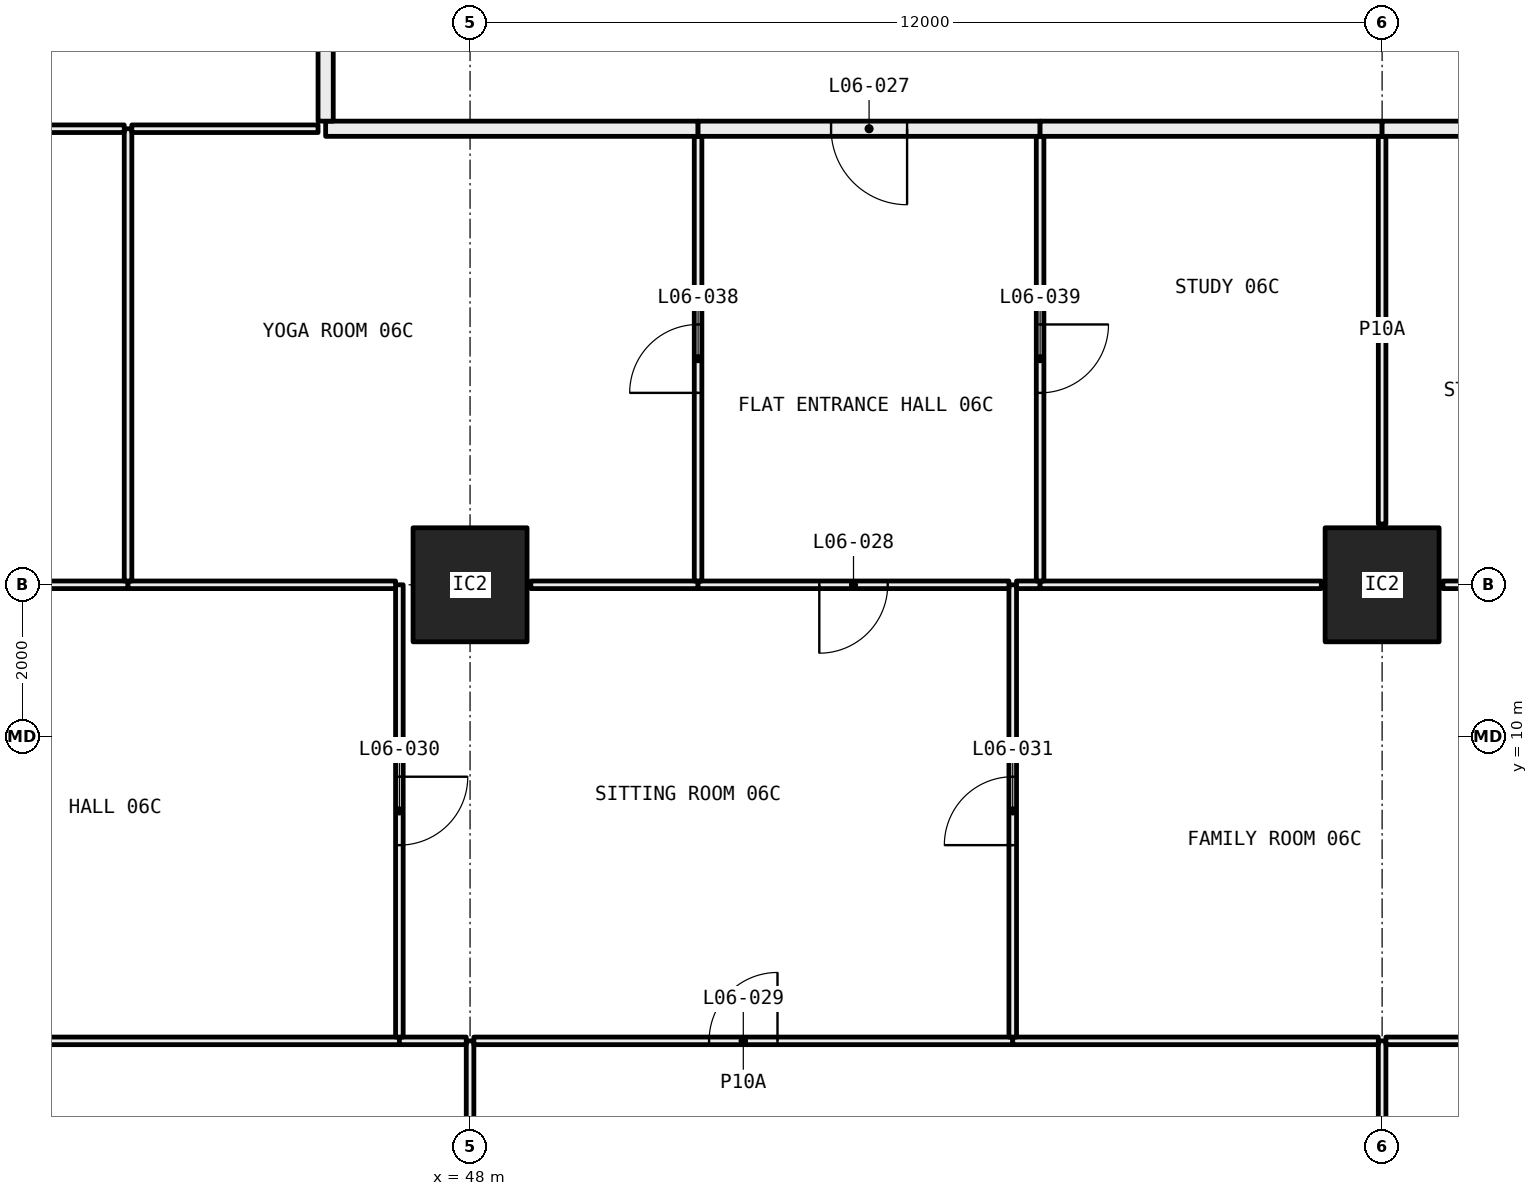
"""IFC4 building model, lengths in metres.
Left out: names, types, materials, properties, quantities, classifications, styles, units other than length and angle.
Written with IfcOpenShell. Run it as: python <this file> out.ifc"""

import sys

from ifc_helpers import new_model, si_unit, direction, frame, frame_2d, origin, origin_2d, place, context, subcontext, project, spatial, rectangle, hollow_rectangle, extrude, element, fill, save


model = new_model("IFC4")
c1 = context("Model", 3, precision=1e-05, world=origin(), true_north=direction((0.0, 1.0)))
c2 = subcontext(c1, "Body", "Model", "MODEL_VIEW")
j1 = project(units=[si_unit("LENGTHUNIT", "METRE"), si_unit("PLANEANGLEUNIT", "RADIAN")], contexts=[c1])
p1 = place(None, origin())
s1 = spatial("IfcSite", under=j1, at=p1, CompositionType="ELEMENT")
p2 = place(p1, origin())
s2 = spatial("IfcBuilding", under=s1, at=p2, CompositionType="ELEMENT")
p3 = place(p2, frame((0.0, 0.0, 33.45)))
s3 = spatial("IfcBuildingStorey", under=s2, at=p3, CompositionType="ELEMENT", Elevation=33.45)
for number, where, z_axis, x_axis in (
    (1, (48.0, 12.0, 0.0), (0.0, 0.0, 1.0), (1.0, 0.0, 0.0)),
    (2, (60.0, 12.0, 0.0), (0.0, 0.0, 1.0), (1.0, 0.0, 0.0)),
):
    element("IfcColumn", number, at=place(p3, frame(where, z_axis=z_axis, x_axis=x_axis)), inside=s3, PredefinedType="COLUMN", context=c2, shape_type="SweptSolid", body=[
        extrude(hollow_rectangle(XDim=1.5, YDim=1.5, WallThickness=0.065, at=origin_2d()), origin(), (0.0, 0.0, 1.0), 3.05),
    ])
p4 = place(p3, frame((48.0, 0.72, 0.0), z_axis=(0.0, 0.0, 1.0), x_axis=(0.0, 1.0, 0.0)))
e3 = element("IfcWall", 3, at=p4, inside=s3, PredefinedType="PARTITIONING", context=c2, shape_type="SweptSolid", body=[
    extrude(rectangle(XDim=5.28, YDim=0.1, at=frame_2d((2.64, 0.0))), origin(), (0.0, 0.0, 1.0), 2.45),
])
p5 = place(p4, frame((2.19, 0.0, 0.0)))
e4 = element("IfcOpeningElement", 4, at=p5, cuts=e3, PredefinedType="OPENING", context=c2, shape_type="SweptSolid", body=[
    extrude(rectangle(XDim=0.9, YDim=2.1, at=frame_2d((0.45, 1.05))), frame((0.0, 0.06, 0.0), z_axis=(0.0, -1.0, 0.0), x_axis=(1.0, 0.0, 0.0)), (0.0, 0.0, 1.0), 0.12),
])
p6 = place(p3, frame((47.07, 6.0, 0.0), z_axis=(0.0, 0.0, 1.0), x_axis=(-1.0, 0.0, 0.0)))
e5 = element("IfcWall", 5, at=p6, inside=s3, PredefinedType="PARTITIONING", context=c2, shape_type="SweptSolid", body=[
    extrude(rectangle(XDim=5.02, YDim=0.1, at=frame_2d((2.51, 0.0))), origin(), (0.0, 0.0, 1.0), 3.05),
])
p7 = place(p3, frame((47.95, 6.0, 0.0), z_axis=(0.0, 0.0, 1.0), x_axis=(-1.0, 0.0, 0.0)))
e6 = element("IfcWall", 6, at=p7, inside=s3, PredefinedType="PARTITIONING", context=c2, shape_type="SweptSolid", body=[
    extrude(rectangle(XDim=0.88, YDim=0.1, at=frame_2d((0.44, 0.0))), origin(), (0.0, 0.0, 1.0), 2.45),
])
p8 = place(p3, frame((60.0, 0.72, 0.0), z_axis=(0.0, 0.0, 1.0), x_axis=(0.0, 1.0, 0.0)))
e7 = element("IfcWall", 7, at=p8, inside=s3, PredefinedType="PARTITIONING", context=c2, shape_type="SweptSolid", body=[
    extrude(rectangle(XDim=5.28, YDim=0.1, at=frame_2d((2.64, 0.0))), origin(), (0.0, 0.0, 1.0), 2.45),
])
p9 = place(p8, frame((2.19, 0.0, 0.0)))
e8 = element("IfcOpeningElement", 8, at=p9, cuts=e7, PredefinedType="OPENING", context=c2, shape_type="SweptSolid", body=[
    extrude(rectangle(XDim=0.9, YDim=2.1, at=frame_2d((0.45, 1.05))), frame((0.0, 0.06, 0.0), z_axis=(0.0, -1.0, 0.0), x_axis=(1.0, 0.0, 0.0)), (0.0, 0.0, 1.0), 0.12),
])
p10 = place(p3, frame((55.14, 6.0, 0.0), z_axis=(0.0, 0.0, 1.0), x_axis=(-1.0, 0.0, 0.0)))
e9 = element("IfcWall", 9, at=p10, inside=s3, PredefinedType="PARTITIONING", context=c2, shape_type="SweptSolid", body=[
    extrude(rectangle(XDim=7.09, YDim=0.1, at=frame_2d((3.545, 0.0))), origin(), (0.0, 0.0, 1.0), 2.45),
])
p11 = place(p10, frame((3.095, 0.0, 0.0)))
e10 = element("IfcOpeningElement", 10, at=p11, cuts=e9, PredefinedType="OPENING", context=c2, shape_type="SweptSolid", body=[
    extrude(rectangle(XDim=0.9, YDim=2.1, at=frame_2d((0.45, 1.05))), frame((0.0, 0.06, 0.0), z_axis=(0.0, -1.0, 0.0), x_axis=(1.0, 0.0, 0.0)), (0.0, 0.0, 1.0), 0.12),
])
p12 = place(p3, frame((59.95, 6.0, 0.0), z_axis=(0.0, 0.0, 1.0), x_axis=(-1.0, 0.0, 0.0)))
e11 = element("IfcWall", 11, at=p12, inside=s3, PredefinedType="PARTITIONING", context=c2, shape_type="SweptSolid", body=[
    extrude(rectangle(XDim=4.81, YDim=0.1, at=frame_2d((2.405, 0.0))), origin(), (0.0, 0.0, 1.0), 2.45),
])
p13 = place(p3, frame((63.21, 6.0, 0.0), z_axis=(0.0, 0.0, 1.0), x_axis=(-1.0, 0.0, 0.0)))
e12 = element("IfcWall", 12, at=p13, inside=s3, PredefinedType="PARTITIONING", context=c2, shape_type="SweptSolid", body=[
    extrude(rectangle(XDim=3.16, YDim=0.1, at=frame_2d((1.58, 0.0))), origin(), (0.0, 0.0, 1.0), 2.45),
])
p14 = place(p3, frame((47.07, 6.05, 0.0), z_axis=(0.0, 0.0, 1.0), x_axis=(0.0, 1.0, 0.0)))
e13 = element("IfcWall", 13, at=p14, inside=s3, PredefinedType="PARTITIONING", context=c2, shape_type="SweptSolid", body=[
    extrude(rectangle(XDim=5.95, YDim=0.1, at=frame_2d((2.975, 0.0))), origin(), (0.0, 0.0, 1.0), 2.45),
])
p15 = place(p14, frame((2.525, 0.0, 0.0)))
e14 = element("IfcOpeningElement", 14, at=p15, cuts=e13, PredefinedType="OPENING", context=c2, shape_type="SweptSolid", body=[
    extrude(rectangle(XDim=0.9, YDim=2.1, at=frame_2d((0.45, 1.05))), frame((0.0, 0.06, 0.0), z_axis=(0.0, -1.0, 0.0), x_axis=(1.0, 0.0, 0.0)), (0.0, 0.0, 1.0), 0.12),
])
p16 = place(p3, frame((43.5, 12.0, 0.0), z_axis=(0.0, 0.0, 1.0), x_axis=(-1.0, 0.0, 0.0)))
e15 = element("IfcWall", 15, at=p16, inside=s3, PredefinedType="PARTITIONING", context=c2, shape_type="SweptSolid", body=[
    extrude(rectangle(XDim=4.45, YDim=0.1, at=frame_2d((2.225, 0.0))), origin(), (0.0, 0.0, 1.0), 2.45),
])
p17 = place(p16, frame((1.775, 0.0, 0.0)))
e16 = element("IfcOpeningElement", 16, at=p17, cuts=e15, PredefinedType="OPENING", context=c2, shape_type="SweptSolid", body=[
    extrude(rectangle(XDim=0.9, YDim=2.1, at=frame_2d((0.45, 1.05))), frame((0.0, 0.06, 0.0), z_axis=(0.0, -1.0, 0.0), x_axis=(1.0, 0.0, 0.0)), (0.0, 0.0, 1.0), 0.12),
])
p18 = place(p3, frame((47.02, 12.0, 0.0), z_axis=(0.0, 0.0, 1.0), x_axis=(-1.0, 0.0, 0.0)))
e17 = element("IfcWall", 17, at=p18, inside=s3, PredefinedType="PARTITIONING", context=c2, shape_type="SweptSolid", body=[
    extrude(rectangle(XDim=3.52, YDim=0.1, at=frame_2d((1.76, 0.0))), origin(), (0.0, 0.0, 1.0), 2.45),
])
p19 = place(p3, frame((55.14, 6.05, 0.0), z_axis=(0.0, 0.0, 1.0), x_axis=(0.0, 1.0, 0.0)))
e18 = element("IfcWall", 18, at=p19, inside=s3, PredefinedType="PARTITIONING", context=c2, shape_type="SweptSolid", body=[
    extrude(rectangle(XDim=5.95, YDim=0.1, at=frame_2d((2.975, 0.0))), origin(), (0.0, 0.0, 1.0), 2.45),
])
p20 = place(p19, frame((2.525, 0.0, 0.0)))
e19 = element("IfcOpeningElement", 19, at=p20, cuts=e18, PredefinedType="OPENING", context=c2, shape_type="SweptSolid", body=[
    extrude(rectangle(XDim=0.9, YDim=2.1, at=frame_2d((0.45, 1.05))), frame((0.0, 0.06, 0.0), z_axis=(0.0, -1.0, 0.0), x_axis=(1.0, 0.0, 0.0)), (0.0, 0.0, 1.0), 0.12),
])
p21 = place(p3, frame((51.0, 12.0, 0.0), z_axis=(0.0, 0.0, 1.0), x_axis=(-1.0, 0.0, 0.0)))
e20 = element("IfcWall", 20, at=p21, inside=s3, PredefinedType="PARTITIONING", context=c2, shape_type="SweptSolid", body=[
    extrude(rectangle(XDim=2.2, YDim=0.1, at=frame_2d((1.1, 0.0))), origin(), (0.0, 0.0, 1.0), 2.45),
])
p22 = place(p3, frame((55.09, 12.0, 0.0), z_axis=(0.0, 0.0, 1.0), x_axis=(-1.0, 0.0, 0.0)))
e21 = element("IfcWall", 21, at=p22, inside=s3, PredefinedType="PARTITIONING", context=c2, shape_type="SweptSolid", body=[
    extrude(rectangle(XDim=4.09, YDim=0.1, at=frame_2d((2.045, 0.0))), origin(), (0.0, 0.0, 1.0), 2.45),
])
p23 = place(p22, frame((1.595, 0.0, 0.0)))
e22 = element("IfcOpeningElement", 22, at=p23, cuts=e21, PredefinedType="OPENING", context=c2, shape_type="SweptSolid", body=[
    extrude(rectangle(XDim=0.9, YDim=2.1, at=frame_2d((0.45, 1.05))), frame((0.0, 0.06, 0.0), z_axis=(0.0, -1.0, 0.0), x_axis=(1.0, 0.0, 0.0)), (0.0, 0.0, 1.0), 0.12),
])
p24 = place(p3, frame((55.5, 12.0, 0.0), z_axis=(0.0, 0.0, 1.0), x_axis=(-1.0, 0.0, 0.0)))
e23 = element("IfcWall", 23, at=p24, inside=s3, PredefinedType="PARTITIONING", context=c2, shape_type="SweptSolid", body=[
    extrude(rectangle(XDim=0.31, YDim=0.1, at=frame_2d((0.155, 0.0))), origin(), (0.0, 0.0, 1.0), 2.45),
])
p25 = place(p3, frame((59.2, 12.0, 0.0), z_axis=(0.0, 0.0, 1.0), x_axis=(-1.0, 0.0, 0.0)))
e24 = element("IfcWall", 24, at=p25, inside=s3, PredefinedType="PARTITIONING", context=c2, shape_type="SweptSolid", body=[
    extrude(rectangle(XDim=3.7, YDim=0.1, at=frame_2d((1.85, 0.0))), origin(), (0.0, 0.0, 1.0), 2.45),
])
p26 = place(p3, frame((62.925, 12.0, 0.0), z_axis=(0.0, 0.0, 1.0), x_axis=(-1.0, 0.0, 0.0)))
e25 = element("IfcWall", 25, at=p26, inside=s3, PredefinedType="PARTITIONING", context=c2, shape_type="SweptSolid", body=[
    extrude(rectangle(XDim=2.125, YDim=0.1, at=frame_2d((1.062, 0.0))), origin(), (0.0, 0.0, 1.0), 2.45),
])
p27 = place(p26, frame((0.613, 0.0, 0.0)))
e26 = element("IfcOpeningElement", 26, at=p27, cuts=e25, PredefinedType="OPENING", context=c2, shape_type="SweptSolid", body=[
    extrude(rectangle(XDim=0.9, YDim=2.1, at=frame_2d((0.45, 1.05))), frame((0.0, 0.06, 0.0), z_axis=(0.0, -1.0, 0.0), x_axis=(1.0, 0.0, 0.0)), (0.0, 0.0, 1.0), 0.12),
])
p28 = place(p3, frame((43.5, 12.05, 0.0), z_axis=(0.0, 0.0, 1.0), x_axis=(0.0, 1.0, 0.0)))
e27 = element("IfcWall", 27, at=p28, inside=s3, PredefinedType="PARTITIONING", context=c2, shape_type="SweptSolid", body=[
    extrude(rectangle(XDim=5.95, YDim=0.1, at=frame_2d((2.975, 0.0))), origin(), (0.0, 0.0, 1.0), 2.45),
])
p29 = place(p3, frame((43.45, 18.0, 0.0), z_axis=(0.0, 0.0, 1.0), x_axis=(-1.0, 0.0, 0.0)))
e28 = element("IfcWall", 28, at=p29, inside=s3, PredefinedType="PARTITIONING", context=c2, shape_type="SweptSolid", body=[
    extrude(rectangle(XDim=2.95, YDim=0.1, at=frame_2d((1.475, 0.0))), origin(), (0.0, 0.0, 1.0), 3.05),
])
p30 = place(p3, frame((51.0, 12.05, 0.0), z_axis=(0.0, 0.0, 1.0), x_axis=(0.0, 1.0, 0.0)))
e29 = element("IfcWall", 29, at=p30, inside=s3, PredefinedType="PARTITIONING", context=c2, shape_type="SweptSolid", body=[
    extrude(rectangle(XDim=5.85, YDim=0.1, at=frame_2d((2.925, 0.0))), origin(), (0.0, 0.0, 1.0), 2.45),
])
p31 = place(p30, frame((2.475, 0.0, 0.0)))
e30 = element("IfcOpeningElement", 30, at=p31, cuts=e29, PredefinedType="OPENING", context=c2, shape_type="SweptSolid", body=[
    extrude(rectangle(XDim=0.9, YDim=2.1, at=frame_2d((0.45, 1.05))), frame((0.0, 0.06, 0.0), z_axis=(0.0, -1.0, 0.0), x_axis=(1.0, 0.0, 0.0)), (0.0, 0.0, 1.0), 0.12),
])
p32 = place(p3, frame((46.0, 18.0, 0.0), z_axis=(0.0, 0.0, 1.0), x_axis=(-1.0, 0.0, 0.0)))
e31 = element("IfcWall", 31, at=p32, inside=s3, PredefinedType="PARTITIONING", context=c2, shape_type="SweptSolid", body=[
    extrude(rectangle(XDim=2.45, YDim=0.1, at=frame_2d((1.225, 0.0))), origin(), (0.0, 0.0, 1.0), 3.05),
])
p33 = place(p3, frame((51.0, 18.0, 0.0), z_axis=(0.0, 0.0, 1.0), x_axis=(-1.0, 0.0, 0.0)))
e32 = element("IfcWall", 32, at=p33, inside=s3, PredefinedType="PARTITIONING", context=c2, shape_type="SweptSolid", body=[
    extrude(rectangle(XDim=4.9, YDim=0.2, at=frame_2d((2.45, 0.0))), origin(), (0.0, 0.0, 1.0), 3.05),
])
p34 = place(p3, frame((55.5, 12.05, 0.0), z_axis=(0.0, 0.0, 1.0), x_axis=(0.0, 1.0, 0.0)))
e33 = element("IfcWall", 33, at=p34, inside=s3, PredefinedType="PARTITIONING", context=c2, shape_type="SweptSolid", body=[
    extrude(rectangle(XDim=5.85, YDim=0.1, at=frame_2d((2.925, 0.0))), origin(), (0.0, 0.0, 1.0), 2.45),
])
p35 = place(p34, frame((2.475, 0.0, 0.0)))
e34 = element("IfcOpeningElement", 34, at=p35, cuts=e33, PredefinedType="OPENING", context=c2, shape_type="SweptSolid", body=[
    extrude(rectangle(XDim=0.9, YDim=2.1, at=frame_2d((0.45, 1.05))), frame((0.0, 0.06, 0.0), z_axis=(0.0, -1.0, 0.0), x_axis=(1.0, 0.0, 0.0)), (0.0, 0.0, 1.0), 0.12),
])
p36 = place(p3, frame((55.5, 18.0, 0.0), z_axis=(0.0, 0.0, 1.0), x_axis=(-1.0, 0.0, 0.0)))
e35 = element("IfcWall", 35, at=p36, inside=s3, PredefinedType="PARTITIONING", context=c2, shape_type="SweptSolid", body=[
    extrude(rectangle(XDim=4.5, YDim=0.2, at=frame_2d((2.25, 0.0))), origin(), (0.0, 0.0, 1.0), 3.05),
])
p37 = place(p36, frame((1.75, 0.0, 0.0)))
e36 = element("IfcOpeningElement", 36, at=p37, cuts=e35, PredefinedType="OPENING", context=c2, shape_type="SweptSolid", body=[
    extrude(rectangle(XDim=1.0, YDim=2.1, at=frame_2d((0.5, 1.05))), frame((0.0, 0.11, 0.0), z_axis=(0.0, -1.0, 0.0), x_axis=(1.0, 0.0, 0.0)), (0.0, 0.0, 1.0), 0.22),
])
p38 = place(p3, frame((60.0, 12.8, 0.0), z_axis=(0.0, 0.0, 1.0), x_axis=(0.0, 1.0, 0.0)))
e37 = element("IfcWall", 37, at=p38, inside=s3, PredefinedType="PARTITIONING", context=c2, shape_type="SweptSolid", body=[
    extrude(rectangle(XDim=5.1, YDim=0.1, at=frame_2d((2.55, 0.0))), origin(), (0.0, 0.0, 1.0), 3.05),
])
p39 = place(p3, frame((60.0, 18.0, 0.0), z_axis=(0.0, 0.0, 1.0), x_axis=(-1.0, 0.0, 0.0)))
e38 = element("IfcWall", 38, at=p39, inside=s3, PredefinedType="PARTITIONING", context=c2, shape_type="SweptSolid", body=[
    extrude(rectangle(XDim=4.5, YDim=0.2, at=frame_2d((2.25, 0.0))), origin(), (0.0, 0.0, 1.0), 3.05),
])
p40 = place(p3, frame((61.9, 18.0, 0.0), z_axis=(0.0, 0.0, 1.0), x_axis=(-1.0, 0.0, 0.0)))
e39 = element("IfcWall", 39, at=p40, inside=s3, PredefinedType="PARTITIONING", context=c2, shape_type="SweptSolid", body=[
    extrude(rectangle(XDim=1.9, YDim=0.2, at=frame_2d((0.95, 0.0))), origin(), (0.0, 0.0, 1.0), 3.05),
])
p41 = place(p3, frame((46.1, 18.1, 0.0), z_axis=(0.0, 0.0, 1.0), x_axis=(0.0, 1.0, 0.0)))
e40 = element("IfcWall", 40, at=p41, inside=s3, PredefinedType="PARTITIONING", context=c2, shape_type="SweptSolid", body=[
    extrude(rectangle(XDim=6.2, YDim=0.2, at=frame_2d((3.1, 0.0))), origin(), (0.0, 0.0, 1.0), 2.45),
])
p42 = place(p37, origin())
e41 = element("IfcDoor", 41, at=p42, inside=s3, OperationType="SINGLE_SWING_RIGHT", PredefinedType="DOOR", context=c2, shape_type="SweptSolid", body=[
    extrude(rectangle(XDim=1.0, YDim=2.1, at=frame_2d((0.5, 1.05))), frame((0.0, 0.025, 0.0), z_axis=(0.0, -1.0, 0.0), x_axis=(1.0, 0.0, 0.0)), (0.0, 0.0, 1.0), 0.05),
])
fill(e36, e41)
p43 = place(p23, origin())
e42 = element("IfcDoor", 42, at=p43, inside=s3, OperationType="SINGLE_SWING_LEFT", PredefinedType="DOOR", context=c2, shape_type="SweptSolid", body=[
    extrude(rectangle(XDim=0.9, YDim=2.1, at=frame_2d((0.45, 1.05))), frame((0.0, 0.025, 0.0), z_axis=(0.0, -1.0, 0.0), x_axis=(1.0, 0.0, 0.0)), (0.0, 0.0, 1.0), 0.05),
])
fill(e22, e42)
p44 = place(p11, frame((0.9, 0.0, 0.0), x_axis=(-1.0, 0.0, 0.0)))
e43 = element("IfcDoor", 43, at=p44, inside=s3, OperationType="SINGLE_SWING_LEFT", PredefinedType="DOOR", context=c2, shape_type="SweptSolid", body=[
    extrude(rectangle(XDim=0.9, YDim=2.1, at=frame_2d((0.45, 1.05))), frame((0.0, 0.025, 0.0), z_axis=(0.0, -1.0, 0.0), x_axis=(1.0, 0.0, 0.0)), (0.0, 0.0, 1.0), 0.05),
])
fill(e10, e43)
p45 = place(p15, frame((0.9, 0.0, 0.0), x_axis=(-1.0, 0.0, 0.0)))
e44 = element("IfcDoor", 44, at=p45, inside=s3, OperationType="SINGLE_SWING_RIGHT", PredefinedType="DOOR", context=c2, shape_type="SweptSolid", body=[
    extrude(rectangle(XDim=0.9, YDim=2.1, at=frame_2d((0.45, 1.05))), frame((0.0, 0.025, 0.0), z_axis=(0.0, -1.0, 0.0), x_axis=(1.0, 0.0, 0.0)), (0.0, 0.0, 1.0), 0.05),
])
fill(e14, e44)
p46 = place(p20, origin())
e45 = element("IfcDoor", 45, at=p46, inside=s3, OperationType="SINGLE_SWING_RIGHT", PredefinedType="DOOR", context=c2, shape_type="SweptSolid", body=[
    extrude(rectangle(XDim=0.9, YDim=2.1, at=frame_2d((0.45, 1.05))), frame((0.0, 0.025, 0.0), z_axis=(0.0, -1.0, 0.0), x_axis=(1.0, 0.0, 0.0)), (0.0, 0.0, 1.0), 0.05),
])
fill(e19, e45)
p47 = place(p31, origin())
e46 = element("IfcDoor", 46, at=p47, inside=s3, OperationType="SINGLE_SWING_RIGHT", PredefinedType="DOOR", context=c2, shape_type="SweptSolid", body=[
    extrude(rectangle(XDim=0.9, YDim=2.1, at=frame_2d((0.45, 1.05))), frame((0.0, 0.025, 0.0), z_axis=(0.0, -1.0, 0.0), x_axis=(1.0, 0.0, 0.0)), (0.0, 0.0, 1.0), 0.05),
])
fill(e30, e46)
p48 = place(p35, frame((0.9, 0.0, 0.0), x_axis=(-1.0, 0.0, 0.0)))
e47 = element("IfcDoor", 47, at=p48, inside=s3, OperationType="SINGLE_SWING_RIGHT", PredefinedType="DOOR", context=c2, shape_type="SweptSolid", body=[
    extrude(rectangle(XDim=0.9, YDim=2.1, at=frame_2d((0.45, 1.05))), frame((0.0, 0.025, 0.0), z_axis=(0.0, -1.0, 0.0), x_axis=(1.0, 0.0, 0.0)), (0.0, 0.0, 1.0), 0.05),
])
fill(e34, e47)
save(model, sys.argv[1])
